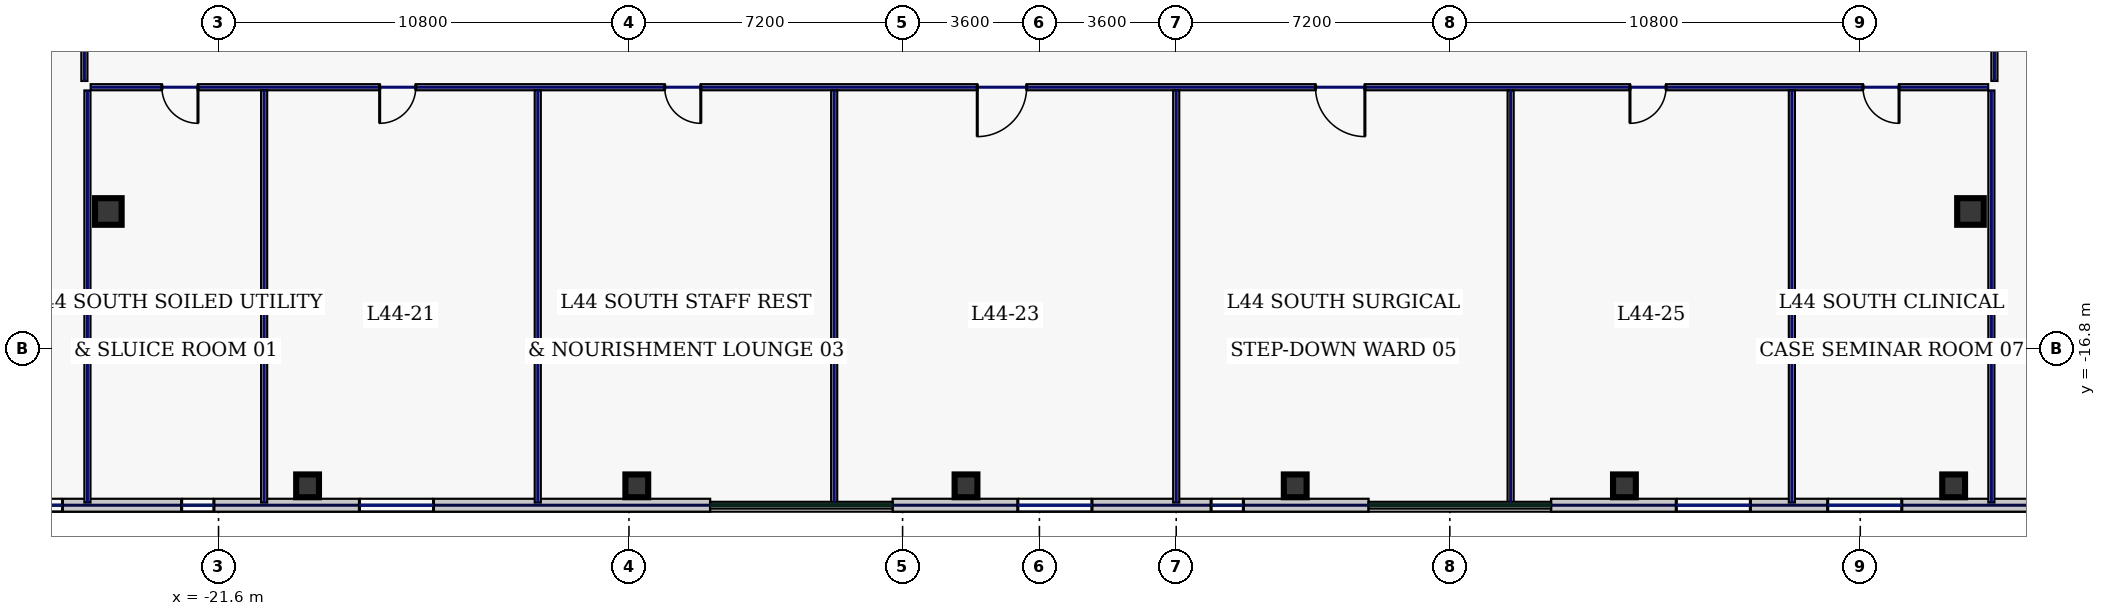
"""IFC4 building model, lengths in metres.
Left out: names, types, materials, properties, quantities, classifications, styles, units other than length and angle.
Written with IfcOpenShell. Run it as: python <this file> out.ifc"""

import sys

from ifc_helpers import new_model, si_unit, direction, frame, frame_2d, origin, origin_2d, place, context, subcontext, project, spatial, rectangle, hollow_rectangle, extrude, element, fill, save


model = new_model("IFC4")
c1 = context("Model", 3, precision=1e-05, world=origin(), true_north=direction((0.0, 1.0)))
c2 = subcontext(c1, "Body", "Model", "MODEL_VIEW")
j1 = project(units=[si_unit("LENGTHUNIT", "METRE"), si_unit("PLANEANGLEUNIT", "RADIAN")], contexts=[c1])
p1 = place(None, origin())
s1 = spatial("IfcSite", under=j1, at=p1, CompositionType="ELEMENT")
p2 = place(p1, origin())
s2 = spatial("IfcBuilding", under=s1, at=p2, CompositionType="ELEMENT")
p3 = place(p2, frame((0.0, 0.0, 192.2)))
s3 = spatial("IfcBuildingStorey", under=s2, at=p3, CompositionType="ELEMENT", Elevation=192.2)
for number, where, z_axis, x_axis in (
    (1, (-24.5, -13.2, 0.0), (0.0, 0.0, 1.0), (1.0, 0.0, 0.0)),
    (2, (24.5, -13.2, 0.0), (0.0, 0.0, 1.0), (1.0, 0.0, 0.0)),
):
    element("IfcColumn", number, at=place(p3, frame(where, z_axis=z_axis, x_axis=x_axis)), inside=s3, PredefinedType="COLUMN", context=c2, shape_type="SweptSolid", body=[
        extrude(hollow_rectangle(XDim=0.7, YDim=0.7, WallThickness=0.032, at=origin_2d()), origin(), (0.0, 0.0, 1.0), 3.74),
    ])
for number, where, z_axis, x_axis in (
    (3, (-19.257, -20.42, 0.0), (0.0, 0.0, 1.0), (1.0, 0.0, 0.0)),
    (4, (-10.594, -20.42, 0.0), (0.0, 0.0, 1.0), (1.0, 0.0, 0.0)),
    (5, (-1.931, -20.42, 0.0), (0.0, 0.0, 1.0), (1.0, 0.0, 0.0)),
    (6, (6.731, -20.42, 0.0), (0.0, 0.0, 1.0), (1.0, 0.0, 0.0)),
    (7, (15.394, -20.42, 0.0), (0.0, 0.0, 1.0), (1.0, 0.0, 0.0)),
    (8, (24.057, -20.42, 0.0), (0.0, 0.0, 1.0), (1.0, 0.0, 0.0)),
):
    element("IfcColumn", number, at=place(p3, frame(where, z_axis=z_axis, x_axis=x_axis)), inside=s3, PredefinedType="COLUMN", context=c2, shape_type="SweptSolid", body=[
        extrude(hollow_rectangle(XDim=0.6, YDim=0.6, WallThickness=0.028, at=origin_2d()), origin(), (0.0, 0.0, 1.0), 3.74),
    ])
p4 = place(p3, frame((-28.6, -20.93, 0.0), z_axis=(0.0, 0.0, 1.0), x_axis=(1.0, 0.0, 0.0)))
e9 = element("IfcWall", 9, at=p4, inside=s3, PredefinedType="STANDARD", context=c2, shape_type="SweptSolid", body=[
    extrude(rectangle(XDim=19.937, YDim=0.34, at=frame_2d((9.969, 0.0))), origin(), (0.0, 0.0, 1.0), 3.74),
])
p5 = place(p4, frame((2.044, 0.0, 0.8)))
e10 = element("IfcOpeningElement", 10, at=p5, cuts=e9, PredefinedType="OPENING", context=c2, shape_type="SweptSolid", body=[
    extrude(rectangle(XDim=0.85, YDim=1.85, at=frame_2d((0.425, 0.925))), frame((0.0, 0.18, 0.0), z_axis=(0.0, -1.0, 0.0), x_axis=(1.0, 0.0, 0.0)), (0.0, 0.0, 1.0), 0.36),
])
p6 = place(p4, frame((6.029, 0.0, 0.8)))
e11 = element("IfcOpeningElement", 11, at=p6, cuts=e9, PredefinedType="OPENING", context=c2, shape_type="SweptSolid", body=[
    extrude(rectangle(XDim=0.85, YDim=1.85, at=frame_2d((0.425, 0.925))), frame((0.0, 0.18, 0.0), z_axis=(0.0, -1.0, 0.0), x_axis=(1.0, 0.0, 0.0)), (0.0, 0.0, 1.0), 0.36),
])
p7 = place(p4, frame((10.707, 0.0, 0.8)))
e12 = element("IfcOpeningElement", 12, at=p7, cuts=e9, PredefinedType="OPENING", context=c2, shape_type="SweptSolid", body=[
    extrude(rectangle(XDim=1.95, YDim=2.1, at=frame_2d((0.975, 1.05))), frame((0.0, 0.18, 0.0), z_axis=(0.0, -1.0, 0.0), x_axis=(1.0, 0.0, 0.0)), (0.0, 0.0, 1.0), 0.36),
])
p8 = place(p3, frame((-3.863, -20.93, 0.0), z_axis=(0.0, 0.0, 1.0), x_axis=(1.0, 0.0, 0.0)))
e13 = element("IfcWall", 13, at=p8, inside=s3, PredefinedType="STANDARD", context=c2, shape_type="SweptSolid", body=[
    extrude(rectangle(XDim=12.526, YDim=0.34, at=frame_2d((6.263, 0.0))), origin(), (0.0, 0.0, 1.0), 3.74),
])
p9 = place(p8, frame((3.295, 0.0, 0.8)))
e14 = element("IfcOpeningElement", 14, at=p9, cuts=e13, PredefinedType="OPENING", context=c2, shape_type="SweptSolid", body=[
    extrude(rectangle(XDim=1.95, YDim=2.1, at=frame_2d((0.975, 1.05))), frame((0.0, 0.18, 0.0), z_axis=(0.0, -1.0, 0.0), x_axis=(1.0, 0.0, 0.0)), (0.0, 0.0, 1.0), 0.36),
])
p10 = place(p8, frame((8.38, 0.0, 0.8)))
e15 = element("IfcOpeningElement", 15, at=p10, cuts=e13, PredefinedType="OPENING", context=c2, shape_type="SweptSolid", body=[
    extrude(rectangle(XDim=0.85, YDim=1.85, at=frame_2d((0.425, 0.925))), frame((0.0, 0.18, 0.0), z_axis=(0.0, -1.0, 0.0), x_axis=(1.0, 0.0, 0.0)), (0.0, 0.0, 1.0), 0.36),
])
p11 = place(p3, frame((13.463, -20.93, 0.0), z_axis=(0.0, 0.0, 1.0), x_axis=(1.0, 0.0, 0.0)))
e16 = element("IfcWall", 16, at=p11, inside=s3, PredefinedType="STANDARD", context=c2, shape_type="SweptSolid", body=[
    extrude(rectangle(XDim=19.937, YDim=0.34, at=frame_2d((9.969, 0.0))), origin(), (0.0, 0.0, 1.0), 3.74),
])
p12 = place(p11, frame((3.295, 0.0, 0.8)))
e17 = element("IfcOpeningElement", 17, at=p12, cuts=e16, PredefinedType="OPENING", context=c2, shape_type="SweptSolid", body=[
    extrude(rectangle(XDim=1.95, YDim=2.1, at=frame_2d((0.975, 1.05))), frame((0.0, 0.18, 0.0), z_axis=(0.0, -1.0, 0.0), x_axis=(1.0, 0.0, 0.0)), (0.0, 0.0, 1.0), 0.36),
])
p13 = place(p11, frame((7.28, 0.0, 0.8)))
e18 = element("IfcOpeningElement", 18, at=p13, cuts=e16, PredefinedType="OPENING", context=c2, shape_type="SweptSolid", body=[
    extrude(rectangle(XDim=1.95, YDim=2.1, at=frame_2d((0.975, 1.05))), frame((0.0, 0.18, 0.0), z_axis=(0.0, -1.0, 0.0), x_axis=(1.0, 0.0, 0.0)), (0.0, 0.0, 1.0), 0.36),
])
p14 = place(p11, frame((13.058, 0.0, 0.8)))
e19 = element("IfcOpeningElement", 19, at=p14, cuts=e16, PredefinedType="OPENING", context=c2, shape_type="SweptSolid", body=[
    extrude(rectangle(XDim=0.85, YDim=1.85, at=frame_2d((0.425, 0.925))), frame((0.0, 0.18, 0.0), z_axis=(0.0, -1.0, 0.0), x_axis=(1.0, 0.0, 0.0)), (0.0, 0.0, 1.0), 0.36),
])
p15 = place(p11, frame((15.943, 0.0, 0.8)))
e20 = element("IfcOpeningElement", 20, at=p15, cuts=e16, PredefinedType="OPENING", context=c2, shape_type="SweptSolid", body=[
    extrude(rectangle(XDim=1.95, YDim=2.1, at=frame_2d((0.975, 1.05))), frame((0.0, 0.18, 0.0), z_axis=(0.0, -1.0, 0.0), x_axis=(1.0, 0.0, 0.0)), (0.0, 0.0, 1.0), 0.36),
])
p16 = place(p3, frame((-25.13, -9.765, 0.0), z_axis=(0.0, 0.0, 1.0), x_axis=(0.0, 1.0, 0.0)))
e21 = element("IfcWall", 21, at=p16, inside=s3, PredefinedType="PARTITIONING", context=c2, shape_type="SweptSolid", body=[
    extrude(rectangle(XDim=2.98, YDim=0.16, at=frame_2d((1.49, 0.0))), origin(), (0.0, 0.0, 1.0), 3.74),
])
p17 = place(p16, frame((1.1, 0.0, 0.0)))
e22 = element("IfcOpeningElement", 22, at=p17, cuts=e21, PredefinedType="OPENING", context=c2, shape_type="SweptSolid", body=[
    extrude(rectangle(XDim=0.95, YDim=2.2, at=frame_2d((0.475, 1.1))), frame((0.0, 0.09, 0.0), z_axis=(0.0, -1.0, 0.0), x_axis=(1.0, 0.0, 0.0)), (0.0, 0.0, 1.0), 0.18),
])
p18 = place(p3, frame((25.13, -6.785, 0.0), z_axis=(0.0, 0.0, 1.0), x_axis=(0.0, -1.0, 0.0)))
e23 = element("IfcWall", 23, at=p18, inside=s3, PredefinedType="PARTITIONING", context=c2, shape_type="SweptSolid", body=[
    extrude(rectangle(XDim=2.98, YDim=0.16, at=frame_2d((1.49, 0.0))), origin(), (0.0, 0.0, 1.0), 3.74),
])
p19 = place(p18, frame((1.1, 0.0, 0.0)))
e24 = element("IfcOpeningElement", 24, at=p19, cuts=e23, PredefinedType="OPENING", context=c2, shape_type="SweptSolid", body=[
    extrude(rectangle(XDim=0.95, YDim=2.2, at=frame_2d((0.475, 1.1))), frame((0.0, 0.09, 0.0), z_axis=(0.0, -1.0, 0.0), x_axis=(1.0, 0.0, 0.0)), (0.0, 0.0, 1.0), 0.18),
])
p20 = place(p3, frame((24.965, -9.93, 0.0), z_axis=(0.0, 0.0, 1.0), x_axis=(-1.0, 0.0, 0.0)))
e25 = element("IfcWall", 25, at=p20, inside=s3, PredefinedType="PARTITIONING", context=c2, shape_type="SweptSolid", body=[
    extrude(rectangle(XDim=49.93, YDim=0.16, at=frame_2d((24.965, 0.0))), origin(), (0.0, 0.0, 1.0), 3.74),
])
p21 = place(p20, frame((47.106, 0.0, 0.0)))
e26 = element("IfcOpeningElement", 26, at=p21, cuts=e25, PredefinedType="OPENING", context=c2, shape_type="SweptSolid", body=[
    extrude(rectangle(XDim=0.95, YDim=2.2, at=frame_2d((0.475, 1.1))), frame((0.0, 0.09, 0.0), z_axis=(0.0, -1.0, 0.0), x_axis=(1.0, 0.0, 0.0)), (0.0, 0.0, 1.0), 0.18),
])
p22 = place(p20, frame((41.375, 0.0, 0.0)))
e27 = element("IfcOpeningElement", 27, at=p22, cuts=e25, PredefinedType="OPENING", context=c2, shape_type="SweptSolid", body=[
    extrude(rectangle(XDim=0.95, YDim=2.2, at=frame_2d((0.475, 1.1))), frame((0.0, 0.09, 0.0), z_axis=(0.0, -1.0, 0.0), x_axis=(1.0, 0.0, 0.0)), (0.0, 0.0, 1.0), 0.18),
])
p23 = place(p20, frame((33.875, 0.0, 0.0)))
e28 = element("IfcOpeningElement", 28, at=p23, cuts=e25, PredefinedType="OPENING", context=c2, shape_type="SweptSolid", body=[
    extrude(rectangle(XDim=0.95, YDim=2.2, at=frame_2d((0.475, 1.1))), frame((0.0, 0.09, 0.0), z_axis=(0.0, -1.0, 0.0), x_axis=(1.0, 0.0, 0.0)), (0.0, 0.0, 1.0), 0.18),
])
p24 = place(p20, frame((25.3, 0.0, 0.0)))
e29 = element("IfcOpeningElement", 29, at=p24, cuts=e25, PredefinedType="OPENING", context=c2, shape_type="SweptSolid", body=[
    extrude(rectangle(XDim=1.3, YDim=2.2, at=frame_2d((0.65, 1.1))), frame((0.0, 0.09, 0.0), z_axis=(0.0, -1.0, 0.0), x_axis=(1.0, 0.0, 0.0)), (0.0, 0.0, 1.0), 0.18),
])
p25 = place(p20, frame((16.4, 0.0, 0.0)))
e30 = element("IfcOpeningElement", 30, at=p25, cuts=e25, PredefinedType="OPENING", context=c2, shape_type="SweptSolid", body=[
    extrude(rectangle(XDim=1.3, YDim=2.2, at=frame_2d((0.65, 1.1))), frame((0.0, 0.09, 0.0), z_axis=(0.0, -1.0, 0.0), x_axis=(1.0, 0.0, 0.0)), (0.0, 0.0, 1.0), 0.18),
])
p26 = place(p20, frame((8.475, 0.0, 0.0)))
e31 = element("IfcOpeningElement", 31, at=p26, cuts=e25, PredefinedType="OPENING", context=c2, shape_type="SweptSolid", body=[
    extrude(rectangle(XDim=0.95, YDim=2.2, at=frame_2d((0.475, 1.1))), frame((0.0, 0.09, 0.0), z_axis=(0.0, -1.0, 0.0), x_axis=(1.0, 0.0, 0.0)), (0.0, 0.0, 1.0), 0.18),
])
p27 = place(p20, frame((2.344, 0.0, 0.0)))
e32 = element("IfcOpeningElement", 32, at=p27, cuts=e25, PredefinedType="OPENING", context=c2, shape_type="SweptSolid", body=[
    extrude(rectangle(XDim=0.95, YDim=2.2, at=frame_2d((0.475, 1.1))), frame((0.0, 0.09, 0.0), z_axis=(0.0, -1.0, 0.0), x_axis=(1.0, 0.0, 0.0)), (0.0, 0.0, 1.0), 0.18),
])
for number, where, z_axis, x_axis in (
    (33, (-25.05, -20.86, 0.0), (0.0, 0.0, 1.0), (0.0, 1.0, 0.0)),
    (34, (25.05, -20.86, 0.0), (0.0, 0.0, 1.0), (0.0, 1.0, 0.0)),
    (35, (-20.4, -20.86, 0.0), (0.0, 0.0, 1.0), (0.0, 1.0, 0.0)),
    (36, (-13.2, -20.86, 0.0), (0.0, 0.0, 1.0), (0.0, 1.0, 0.0)),
    (37, (-5.4, -20.86, 0.0), (0.0, 0.0, 1.0), (0.0, 1.0, 0.0)),
    (38, (3.6, -20.86, 0.0), (0.0, 0.0, 1.0), (0.0, 1.0, 0.0)),
    (39, (12.4, -20.86, 0.0), (0.0, 0.0, 1.0), (0.0, 1.0, 0.0)),
    (40, (19.8, -20.86, 0.0), (0.0, 0.0, 1.0), (0.0, 1.0, 0.0)),
):
    element("IfcWall", number, at=place(p3, frame(where, z_axis=z_axis, x_axis=x_axis)), inside=s3, PredefinedType="PARTITIONING", context=c2, shape_type="SweptSolid", body=[
        extrude(rectangle(XDim=10.845, YDim=0.16, at=frame_2d((5.423, 0.0))), origin(), (0.0, 0.0, 1.0), 3.74),
    ])
p28 = place(p5, origin())
e41 = element("IfcWindow", 41, at=p28, inside=s3, PartitioningType="SINGLE_PANEL", PredefinedType="WINDOW", context=c2, shape_type="SweptSolid", body=[
    extrude(rectangle(XDim=0.85, YDim=1.85, at=frame_2d((0.425, 0.925))), frame((0.0, 0.03, 0.0), z_axis=(0.0, -1.0, 0.0), x_axis=(1.0, 0.0, 0.0)), (0.0, 0.0, 1.0), 0.06),
])
fill(e10, e41)
p29 = place(p6, origin())
e42 = element("IfcWindow", 42, at=p29, inside=s3, PartitioningType="SINGLE_PANEL", PredefinedType="WINDOW", context=c2, shape_type="SweptSolid", body=[
    extrude(rectangle(XDim=0.85, YDim=1.85, at=frame_2d((0.425, 0.925))), frame((0.0, 0.03, 0.0), z_axis=(0.0, -1.0, 0.0), x_axis=(1.0, 0.0, 0.0)), (0.0, 0.0, 1.0), 0.06),
])
fill(e11, e42)
p30 = place(p7, origin())
e43 = element("IfcWindow", 43, at=p30, inside=s3, PartitioningType="SINGLE_PANEL", PredefinedType="WINDOW", context=c2, shape_type="SweptSolid", body=[
    extrude(rectangle(XDim=1.95, YDim=2.1, at=frame_2d((0.975, 1.05))), frame((0.0, 0.03, 0.0), z_axis=(0.0, -1.0, 0.0), x_axis=(1.0, 0.0, 0.0)), (0.0, 0.0, 1.0), 0.06),
])
fill(e12, e43)
p31 = place(p9, origin())
e44 = element("IfcWindow", 44, at=p31, inside=s3, PartitioningType="SINGLE_PANEL", PredefinedType="WINDOW", context=c2, shape_type="SweptSolid", body=[
    extrude(rectangle(XDim=1.95, YDim=2.1, at=frame_2d((0.975, 1.05))), frame((0.0, 0.03, 0.0), z_axis=(0.0, -1.0, 0.0), x_axis=(1.0, 0.0, 0.0)), (0.0, 0.0, 1.0), 0.06),
])
fill(e14, e44)
p32 = place(p10, origin())
e45 = element("IfcWindow", 45, at=p32, inside=s3, PartitioningType="SINGLE_PANEL", PredefinedType="WINDOW", context=c2, shape_type="SweptSolid", body=[
    extrude(rectangle(XDim=0.85, YDim=1.85, at=frame_2d((0.425, 0.925))), frame((0.0, 0.03, 0.0), z_axis=(0.0, -1.0, 0.0), x_axis=(1.0, 0.0, 0.0)), (0.0, 0.0, 1.0), 0.06),
])
fill(e15, e45)
p33 = place(p12, origin())
e46 = element("IfcWindow", 46, at=p33, inside=s3, PartitioningType="SINGLE_PANEL", PredefinedType="WINDOW", context=c2, shape_type="SweptSolid", body=[
    extrude(rectangle(XDim=1.95, YDim=2.1, at=frame_2d((0.975, 1.05))), frame((0.0, 0.03, 0.0), z_axis=(0.0, -1.0, 0.0), x_axis=(1.0, 0.0, 0.0)), (0.0, 0.0, 1.0), 0.06),
])
fill(e17, e46)
p34 = place(p13, origin())
e47 = element("IfcWindow", 47, at=p34, inside=s3, PartitioningType="SINGLE_PANEL", PredefinedType="WINDOW", context=c2, shape_type="SweptSolid", body=[
    extrude(rectangle(XDim=1.95, YDim=2.1, at=frame_2d((0.975, 1.05))), frame((0.0, 0.03, 0.0), z_axis=(0.0, -1.0, 0.0), x_axis=(1.0, 0.0, 0.0)), (0.0, 0.0, 1.0), 0.06),
])
fill(e18, e47)
p35 = place(p21, origin())
e48 = element("IfcDoor", 48, at=p35, inside=s3, OperationType="SINGLE_SWING_LEFT", PredefinedType="DOOR", context=c2, shape_type="SweptSolid", body=[
    extrude(rectangle(XDim=0.95, YDim=2.2, at=frame_2d((0.475, 1.1))), frame((0.0, 0.025, 0.0), z_axis=(0.0, -1.0, 0.0), x_axis=(1.0, 0.0, 0.0)), (0.0, 0.0, 1.0), 0.05),
])
fill(e26, e48)
p36 = place(p22, origin())
e49 = element("IfcDoor", 49, at=p36, inside=s3, OperationType="SINGLE_SWING_RIGHT", PredefinedType="DOOR", context=c2, shape_type="SweptSolid", body=[
    extrude(rectangle(XDim=0.95, YDim=2.2, at=frame_2d((0.475, 1.1))), frame((0.0, 0.025, 0.0), z_axis=(0.0, -1.0, 0.0), x_axis=(1.0, 0.0, 0.0)), (0.0, 0.0, 1.0), 0.05),
])
fill(e27, e49)
p37 = place(p23, origin())
e50 = element("IfcDoor", 50, at=p37, inside=s3, OperationType="SINGLE_SWING_LEFT", PredefinedType="DOOR", context=c2, shape_type="SweptSolid", body=[
    extrude(rectangle(XDim=0.95, YDim=2.2, at=frame_2d((0.475, 1.1))), frame((0.0, 0.025, 0.0), z_axis=(0.0, -1.0, 0.0), x_axis=(1.0, 0.0, 0.0)), (0.0, 0.0, 1.0), 0.05),
])
fill(e28, e50)
p38 = place(p24, origin())
e51 = element("IfcDoor", 51, at=p38, inside=s3, OperationType="SINGLE_SWING_RIGHT", PredefinedType="DOOR", context=c2, shape_type="SweptSolid", body=[
    extrude(rectangle(XDim=1.3, YDim=2.2, at=frame_2d((0.65, 1.1))), frame((0.0, 0.025, 0.0), z_axis=(0.0, -1.0, 0.0), x_axis=(1.0, 0.0, 0.0)), (0.0, 0.0, 1.0), 0.05),
])
fill(e29, e51)
p39 = place(p25, origin())
e52 = element("IfcDoor", 52, at=p39, inside=s3, OperationType="SINGLE_SWING_LEFT", PredefinedType="DOOR", context=c2, shape_type="SweptSolid", body=[
    extrude(rectangle(XDim=1.3, YDim=2.2, at=frame_2d((0.65, 1.1))), frame((0.0, 0.025, 0.0), z_axis=(0.0, -1.0, 0.0), x_axis=(1.0, 0.0, 0.0)), (0.0, 0.0, 1.0), 0.05),
])
fill(e30, e52)
p40 = place(p26, origin())
e53 = element("IfcDoor", 53, at=p40, inside=s3, OperationType="SINGLE_SWING_RIGHT", PredefinedType="DOOR", context=c2, shape_type="SweptSolid", body=[
    extrude(rectangle(XDim=0.95, YDim=2.2, at=frame_2d((0.475, 1.1))), frame((0.0, 0.025, 0.0), z_axis=(0.0, -1.0, 0.0), x_axis=(1.0, 0.0, 0.0)), (0.0, 0.0, 1.0), 0.05),
])
fill(e31, e53)
p41 = place(p27, origin())
e54 = element("IfcDoor", 54, at=p41, inside=s3, OperationType="SINGLE_SWING_LEFT", PredefinedType="DOOR", context=c2, shape_type="SweptSolid", body=[
    extrude(rectangle(XDim=0.95, YDim=2.2, at=frame_2d((0.475, 1.1))), frame((0.0, 0.025, 0.0), z_axis=(0.0, -1.0, 0.0), x_axis=(1.0, 0.0, 0.0)), (0.0, 0.0, 1.0), 0.05),
])
fill(e32, e54)
save(model, sys.argv[1])
